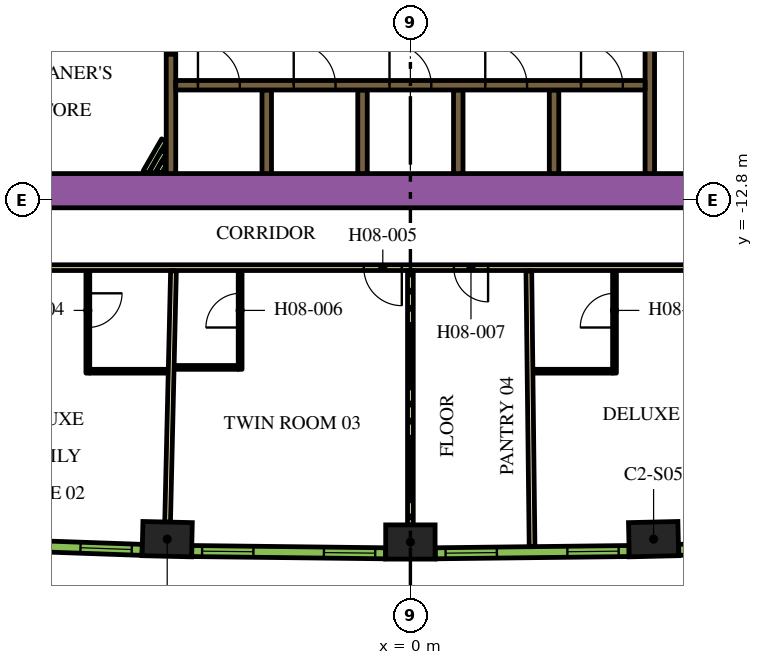
"""IFC4 building model, lengths in metres.
Left out: names, types, materials, properties, quantities, classifications, styles, units other than length and angle.
Written with IfcOpenShell. Run it as: python <this file> out.ifc"""

import sys

from ifc_helpers import new_model, si_unit, direction, frame, frame_2d, origin, origin_2d, place, context, subcontext, project, spatial, rectangle, extrude, element, fill, save


model = new_model("IFC4")
c1 = context("Model", 3, precision=1e-05, world=origin(), true_north=direction((0.0, 1.0)))
c2 = subcontext(c1, "Body", "Model", "MODEL_VIEW")
j1 = project(units=[si_unit("LENGTHUNIT", "METRE"), si_unit("PLANEANGLEUNIT", "RADIAN")], contexts=[c1])
p1 = place(None, origin())
s1 = spatial("IfcSite", under=j1, at=p1, CompositionType="ELEMENT")
p2 = place(p1, origin())
s2 = spatial("IfcBuilding", under=s1, at=p2, CompositionType="ELEMENT")
p3 = place(p2, frame((0.0, 0.0, 111.0)))
s3 = spatial("IfcBuildingStorey", under=s2, at=p3, CompositionType="ELEMENT", Elevation=111.0)
for number, where, z_axis, x_axis in (
    (1, (-6.399, -21.719, 0.0), (0.0, 0.0, 1.0), (1.0, -0.023, 0.0)),
    (2, (0.0, -21.794, 0.0), (0.0, 0.0, 1.0), (1.0, 0.0, 0.0)),
    (3, (6.399, -21.719, 0.0), (0.0, 0.0, 1.0), (1.0, 0.023, 0.0)),
):
    element("IfcColumn", number, at=place(p3, frame(where, z_axis=z_axis, x_axis=x_axis)), inside=s3, PredefinedType="COLUMN", context=c2, shape_type="SweptSolid", body=[
        extrude(rectangle(XDim=1.3, YDim=0.9, at=origin_2d()), origin(), (0.0, 0.0, 1.0), 3.9),
    ])
p4 = place(p3, frame((-12.019, -12.55, 0.0), z_axis=(0.0, 0.0, 1.0), x_axis=(1.0, 0.0, 0.0)))
e4 = element("IfcWall", 4, at=p4, inside=s3, PredefinedType="SOLIDWALL", context=c2, shape_type="SweptSolid", body=[
    extrude(rectangle(XDim=21.63, YDim=0.9, at=frame_2d((10.815, 0.0))), origin(), (0.0, 0.0, 1.0), 3.9),
])
p5 = place(p3, frame((12.84, -9.261, 0.0), z_axis=(0.0, 0.0, 1.0), x_axis=(-0.866013990052, 0.500019768644, 0.0)))
e5 = element("IfcWall", 5, at=p5, inside=s3, PredefinedType="SOLIDWALL", context=c2, shape_type="SweptSolid", body=[
    extrude(rectangle(XDim=6.8, YDim=0.25, at=frame_2d((3.4, 0.0))), origin(), (0.0, 0.0, 1.0), 3.9),
])
p6 = place(p3, frame((-12.84, -9.261, 0.0), z_axis=(0.0, 0.0, 1.0), x_axis=(0.866016039709, 0.500016218704, 0.0)))
e6 = element("IfcWall", 6, at=p6, inside=s3, PredefinedType="SOLIDWALL", context=c2, shape_type="SweptSolid", body=[
    extrude(rectangle(XDim=7.05, YDim=0.25, at=frame_2d((3.525, 0.0))), origin(), (0.0, 0.0, 1.0), 3.9),
])
p7 = place(p3, frame((-3.78, -12.1, 0.0), z_axis=(0.0, 0.0, 1.0), x_axis=(0.0, 1.0, 0.0)))
e7 = element("IfcWall", 7, at=p7, inside=s3, PredefinedType="SOLIDWALL", context=c2, shape_type="SweptSolid", body=[
    extrude(rectangle(XDim=2.2, YDim=0.25, at=frame_2d((1.1, 0.0))), origin(), (0.0, 0.0, 1.0), 3.9),
])
p8 = place(p3, frame((-6.3, -12.1, 0.0), z_axis=(0.0, 0.0, 1.0), x_axis=(0.0, 1.0, 0.0)))
e8 = element("IfcWall", 8, at=p8, inside=s3, PredefinedType="SOLIDWALL", context=c2, shape_type="SweptSolid", body=[
    extrude(rectangle(XDim=3.146, YDim=0.25, at=frame_2d((1.573, 0.0))), origin(), (0.0, 0.0, 1.0), 3.9),
])
p9 = place(p3, frame((6.3, -8.67, 0.0), z_axis=(0.0, 0.0, 1.0), x_axis=(0.0, -1.0, 0.0)))
e9 = element("IfcWall", 9, at=p9, inside=s3, PredefinedType="SOLIDWALL", context=c2, shape_type="SweptSolid", body=[
    extrude(rectangle(XDim=3.43, YDim=0.25, at=frame_2d((1.715, 0.0))), origin(), (0.0, 0.0, 1.0), 3.9),
])
for number, where, z_axis, x_axis in (
    (10, (3.78, -12.1, 0.0), (0.0, 0.0, 1.0), (0.0, 1.0, 0.0)),
    (11, (1.26, -12.1, 0.0), (0.0, 0.0, 1.0), (0.0, 1.0, 0.0)),
    (12, (-1.26, -12.1, 0.0), (0.0, 0.0, 1.0), (0.0, 1.0, 0.0)),
):
    element("IfcWall", number, at=place(p3, frame(where, z_axis=z_axis, x_axis=x_axis)), inside=s3, PredefinedType="SOLIDWALL", context=c2, shape_type="SweptSolid", body=[
        extrude(rectangle(XDim=2.2, YDim=0.25, at=frame_2d((1.1, 0.0))), origin(), (0.0, 0.0, 1.0), 3.9),
    ])
p10 = place(p3, frame((-6.968, -12.068, 0.0), z_axis=(0.0, 0.0, 1.0), x_axis=(0.49998975084, 0.866031321059, 0.0)))
e13 = element("IfcWall", 13, at=p10, inside=s3, PredefinedType="PARTITIONING", context=c2, shape_type="SweptSolid", body=[
    extrude(rectangle(XDim=0.975, YDim=0.15, at=frame_2d((0.488, 0.0))), origin(), (0.0, 0.0, 1.0), 2.75),
])
p11 = place(p3, frame((-6.794, -12.068, 0.0), z_axis=(0.0, 0.0, 1.0), x_axis=(0.49985693963, 0.866107983974, 0.0)))
e14 = element("IfcWall", 14, at=p11, inside=s3, PredefinedType="PARTITIONING", context=c2, shape_type="SweptSolid", body=[
    extrude(rectangle(XDim=0.629, YDim=0.15, at=frame_2d((0.314, 0.0))), origin(), (0.0, 0.0, 1.0), 2.75),
])
p12 = place(p3, frame((-6.621, -12.068, 0.0), z_axis=(0.0, 0.0, 1.0), x_axis=(0.500046963369, 0.865998287773, 0.0)))
e15 = element("IfcWall", 15, at=p12, inside=s3, PredefinedType="PARTITIONING", context=c2, shape_type="SweptSolid", body=[
    extrude(rectangle(XDim=0.282, YDim=0.15, at=frame_2d((0.141, 0.0))), origin(), (0.0, 0.0, 1.0), 2.75),
])
p13 = place(p3, frame((-6.175, -9.775, 0.0), z_axis=(0.0, 0.0, 1.0), x_axis=(1.0, 0.0, 0.0)))
e16 = element("IfcWall", 16, at=p13, inside=s3, PredefinedType="SOLIDWALL", context=c2, shape_type="SweptSolid", body=[
    extrude(rectangle(XDim=12.35, YDim=0.25, at=frame_2d((6.175, 0.0))), origin(), (0.0, 0.0, 1.0), 3.9),
])
p14 = place(p13, frame((0.585, 0.0, 0.0)))
e17 = element("IfcOpeningElement", 17, at=p14, cuts=e16, PredefinedType="OPENING", context=c2, shape_type="SweptSolid", body=[
    extrude(rectangle(XDim=1.1, YDim=2.1, at=frame_2d((0.55, 1.05))), frame((0.0, 0.135, 0.0), z_axis=(0.0, -1.0, 0.0), x_axis=(1.0, 0.0, 0.0)), (0.0, 0.0, 1.0), 0.27),
])
p15 = place(p13, frame((3.105, 0.0, 0.0)))
e18 = element("IfcOpeningElement", 18, at=p15, cuts=e16, PredefinedType="OPENING", context=c2, shape_type="SweptSolid", body=[
    extrude(rectangle(XDim=1.1, YDim=2.1, at=frame_2d((0.55, 1.05))), frame((0.0, 0.135, 0.0), z_axis=(0.0, -1.0, 0.0), x_axis=(1.0, 0.0, 0.0)), (0.0, 0.0, 1.0), 0.27),
])
p16 = place(p13, frame((5.625, 0.0, 0.0)))
e19 = element("IfcOpeningElement", 19, at=p16, cuts=e16, PredefinedType="OPENING", context=c2, shape_type="SweptSolid", body=[
    extrude(rectangle(XDim=1.1, YDim=2.1, at=frame_2d((0.55, 1.05))), frame((0.0, 0.135, 0.0), z_axis=(0.0, -1.0, 0.0), x_axis=(1.0, 0.0, 0.0)), (0.0, 0.0, 1.0), 0.27),
])
p17 = place(p13, frame((8.145, 0.0, 0.0)))
e20 = element("IfcOpeningElement", 20, at=p17, cuts=e16, PredefinedType="OPENING", context=c2, shape_type="SweptSolid", body=[
    extrude(rectangle(XDim=1.1, YDim=2.1, at=frame_2d((0.55, 1.05))), frame((0.0, 0.135, 0.0), z_axis=(0.0, -1.0, 0.0), x_axis=(1.0, 0.0, 0.0)), (0.0, 0.0, 1.0), 0.27),
])
p18 = place(p13, frame((10.665, 0.0, 0.0)))
e21 = element("IfcOpeningElement", 21, at=p18, cuts=e16, PredefinedType="OPENING", context=c2, shape_type="SweptSolid", body=[
    extrude(rectangle(XDim=1.1, YDim=2.1, at=frame_2d((0.55, 1.05))), frame((0.0, 0.135, 0.0), z_axis=(0.0, -1.0, 0.0), x_axis=(1.0, 0.0, 0.0)), (0.0, 0.0, 1.0), 0.27),
])
p19 = place(p3, frame((-6.3, -7.154, 0.0), z_axis=(0.0, 0.0, 1.0), x_axis=(0.0, -1.0, 0.0)))
e22 = element("IfcWall", 22, at=p19, inside=s3, PredefinedType="SOLIDWALL", context=c2, shape_type="SweptSolid", body=[
    extrude(rectangle(XDim=1.8, YDim=0.25, at=frame_2d((0.9, 0.0))), origin(), (0.0, 0.0, 1.0), 3.9),
])
p20 = place(p19, frame((0.45, 0.0, 0.0)))
e23 = element("IfcOpeningElement", 23, at=p20, cuts=e22, PredefinedType="OPENING", context=c2, shape_type="SweptSolid", body=[
    extrude(rectangle(XDim=0.9, YDim=2.1, at=frame_2d((0.45, 1.05))), frame((0.0, 0.135, 0.0), z_axis=(0.0, -1.0, 0.0), x_axis=(1.0, 0.0, 0.0)), (0.0, 0.0, 1.0), 0.27),
])
p21 = place(p3, frame((12.918, -14.575, 0.0), z_axis=(0.0, 0.0, 1.0), x_axis=(-1.0, 0.0, 0.0)))
e24 = element("IfcWall", 24, at=p21, inside=s3, PredefinedType="PARTITIONING", context=c2, shape_type="SweptSolid", body=[
    extrude(rectangle(XDim=25.766, YDim=0.15, at=frame_2d((12.883, 0.0))), origin(), (0.0, 0.0, 1.0), 2.75),
])
p22 = place(p21, frame((24.586, 0.0, 0.0)))
e25 = element("IfcOpeningElement", 25, at=p22, cuts=e24, PredefinedType="OPENING", context=c2, shape_type="SweptSolid", body=[
    extrude(rectangle(XDim=1.0, YDim=2.1, at=frame_2d((0.5, 1.05))), frame((0.0, 0.085, 0.0), z_axis=(0.0, -1.0, 0.0), x_axis=(1.0, 0.0, 0.0)), (0.0, 0.0, 1.0), 0.17),
])
p23 = place(p21, frame((13.144, 0.0, 0.0)))
e26 = element("IfcOpeningElement", 26, at=p23, cuts=e24, PredefinedType="OPENING", context=c2, shape_type="SweptSolid", body=[
    extrude(rectangle(XDim=1.0, YDim=2.1, at=frame_2d((0.5, 1.05))), frame((0.0, 0.085, 0.0), z_axis=(0.0, -1.0, 0.0), x_axis=(1.0, 0.0, 0.0)), (0.0, 0.0, 1.0), 0.17),
])
p24 = place(p21, frame((10.874, 0.0, 0.0)))
e27 = element("IfcOpeningElement", 27, at=p24, cuts=e24, PredefinedType="OPENING", context=c2, shape_type="SweptSolid", body=[
    extrude(rectangle(XDim=0.9, YDim=2.1, at=frame_2d((0.45, 1.05))), frame((0.0, 0.085, 0.0), z_axis=(0.0, -1.0, 0.0), x_axis=(1.0, 0.0, 0.0)), (0.0, 0.0, 1.0), 0.17),
])
p25 = place(p21, frame((0.596, 0.0, 0.0)))
e28 = element("IfcOpeningElement", 28, at=p25, cuts=e24, PredefinedType="OPENING", context=c2, shape_type="SweptSolid", body=[
    extrude(rectangle(XDim=1.0, YDim=2.1, at=frame_2d((0.5, 1.05))), frame((0.0, 0.085, 0.0), z_axis=(0.0, -1.0, 0.0), x_axis=(1.0, 0.0, 0.0)), (0.0, 0.0, 1.0), 0.17),
])
p26 = place(p3, frame((-6.389, -21.269, 0.0), z_axis=(0.0, 0.0, 1.0), x_axis=(0.023377429176, 0.999726710559, 0.0)))
e29 = element("IfcWall", 29, at=p26, inside=s3, PredefinedType="PARTITIONING", context=c2, shape_type="SweptSolid", body=[
    extrude(rectangle(XDim=6.611, YDim=0.15, at=frame_2d((3.305, 0.0))), origin(), (0.0, 0.0, 1.0), 2.75),
])
p27 = place(p3, frame((0.0, -21.344, 0.0), z_axis=(0.0, 0.0, 1.0), x_axis=(0.0, 1.0, 0.0)))
e30 = element("IfcWall", 30, at=p27, inside=s3, PredefinedType="PARTITIONING", context=c2, shape_type="SweptSolid", body=[
    extrude(rectangle(XDim=6.694, YDim=0.15, at=frame_2d((3.347, 0.0))), origin(), (0.0, 0.0, 1.0), 2.75),
])
p28 = place(p3, frame((3.202, -21.916, 0.0), z_axis=(0.0, 0.0, 1.0), x_axis=(-0.011707696285, 0.999931462575, 0.0)))
e31 = element("IfcWall", 31, at=p28, inside=s3, PredefinedType="PARTITIONING", context=c2, shape_type="SweptSolid", body=[
    extrude(rectangle(XDim=7.257, YDim=0.15, at=frame_2d((3.628, 0.0))), origin(), (0.0, 0.0, 1.0), 2.75),
])
p29 = place(p3, frame((-8.488, -14.65, 0.0), z_axis=(0.0, 0.0, 1.0), x_axis=(0.0, -1.0, 0.0)))
e32 = element("IfcWall", 32, at=p29, inside=s3, PredefinedType="PARTITIONING", context=c2, shape_type="SweptSolid", body=[
    extrude(rectangle(XDim=2.7, YDim=0.1, at=frame_2d((1.35, 0.0))), origin(), (0.0, 0.0, 1.0), 2.75),
])
p30 = place(p29, frame((0.6, 0.0, 0.0)))
e33 = element("IfcOpeningElement", 33, at=p30, cuts=e32, PredefinedType="OPENING", context=c2, shape_type="SweptSolid", body=[
    extrude(rectangle(XDim=0.9, YDim=2.1, at=frame_2d((0.45, 1.05))), frame((0.0, 0.06, 0.0), z_axis=(0.0, -1.0, 0.0), x_axis=(1.0, 0.0, 0.0)), (0.0, 0.0, 1.0), 0.12),
])
p31 = place(p3, frame((-8.438, -17.3, 0.0), z_axis=(0.0, 0.0, 1.0), x_axis=(1.0, 0.0, 0.0)))
e34 = element("IfcWall", 34, at=p31, inside=s3, PredefinedType="PARTITIONING", context=c2, shape_type="SweptSolid", body=[
    extrude(rectangle(XDim=2.06, YDim=0.1, at=frame_2d((1.03, 0.0))), origin(), (0.0, 0.0, 1.0), 2.75),
])
p32 = place(p3, frame((-4.48, -17.25, 0.0), z_axis=(0.0, 0.0, 1.0), x_axis=(0.0, 1.0, 0.0)))
e35 = element("IfcWall", 35, at=p32, inside=s3, PredefinedType="PARTITIONING", context=c2, shape_type="SweptSolid", body=[
    extrude(rectangle(XDim=2.6, YDim=0.1, at=frame_2d((1.3, 0.0))), origin(), (0.0, 0.0, 1.0), 2.75),
])
p33 = place(p32, frame((1.1, 0.0, 0.0)))
e36 = element("IfcOpeningElement", 36, at=p33, cuts=e35, PredefinedType="OPENING", context=c2, shape_type="SweptSolid", body=[
    extrude(rectangle(XDim=0.9, YDim=2.1, at=frame_2d((0.45, 1.05))), frame((0.0, 0.06, 0.0), z_axis=(0.0, -1.0, 0.0), x_axis=(1.0, 0.0, 0.0)), (0.0, 0.0, 1.0), 0.12),
])
p34 = place(p3, frame((-4.53, -17.2, 0.0), z_axis=(0.0, 0.0, 1.0), x_axis=(-1.0, 0.0, 0.0)))
e37 = element("IfcWall", 37, at=p34, inside=s3, PredefinedType="PARTITIONING", context=c2, shape_type="SweptSolid", body=[
    extrude(rectangle(XDim=1.68, YDim=0.1, at=frame_2d((0.84, 0.0))), origin(), (0.0, 0.0, 1.0), 2.75),
])
p35 = place(p3, frame((5.371, -17.35, 0.0), z_axis=(0.0, 0.0, 1.0), x_axis=(0.0, 1.0, 0.0)))
e38 = element("IfcWall", 38, at=p35, inside=s3, PredefinedType="PARTITIONING", context=c2, shape_type="SweptSolid", body=[
    extrude(rectangle(XDim=2.7, YDim=0.1, at=frame_2d((1.35, 0.0))), origin(), (0.0, 0.0, 1.0), 2.75),
])
p36 = place(p35, frame((1.2, 0.0, 0.0)))
e39 = element("IfcOpeningElement", 39, at=p36, cuts=e38, PredefinedType="OPENING", context=c2, shape_type="SweptSolid", body=[
    extrude(rectangle(XDim=0.9, YDim=2.1, at=frame_2d((0.45, 1.05))), frame((0.0, 0.06, 0.0), z_axis=(0.0, -1.0, 0.0), x_axis=(1.0, 0.0, 0.0)), (0.0, 0.0, 1.0), 0.12),
])
p37 = place(p3, frame((5.321, -17.3, 0.0), z_axis=(0.0, 0.0, 1.0), x_axis=(-1.0, 0.0, 0.0)))
e40 = element("IfcWall", 40, at=p37, inside=s3, PredefinedType="PARTITIONING", context=c2, shape_type="SweptSolid", body=[
    extrude(rectangle(XDim=2.09, YDim=0.1, at=frame_2d((1.045, 0.0))), origin(), (0.0, 0.0, 1.0), 2.75),
])
p38 = place(p3, frame((-12.157, -21.822, 0.0), z_axis=(0.0, 0.0, 1.0), x_axis=(0.999385993957, -0.035037623812, 0.0)))
e41 = element("IfcWall", 41, at=p38, inside=s3, PredefinedType="SOLIDWALL", context=c2, shape_type="SweptSolid", body=[
    extrude(rectangle(XDim=5.101, YDim=0.29, at=frame_2d((2.55, 0.0))), origin(), (0.0, 0.0, 1.0), 3.65),
])
p39 = place(p38, frame((0.273, 0.0, 0.9)))
e42 = element("IfcOpeningElement", 42, at=p39, cuts=e41, PredefinedType="OPENING", context=c2, shape_type="SweptSolid", body=[
    extrude(rectangle(XDim=1.35, YDim=2.15, at=frame_2d((0.675, 1.075))), frame((0.0, 0.155, 0.0), z_axis=(0.0, -1.0, 0.0), x_axis=(1.0, 0.0, 0.0)), (0.0, 0.0, 1.0), 0.31),
])
p40 = place(p38, frame((3.478, 0.0, 0.9)))
e43 = element("IfcOpeningElement", 43, at=p40, cuts=e41, PredefinedType="OPENING", context=c2, shape_type="SweptSolid", body=[
    extrude(rectangle(XDim=1.35, YDim=2.15, at=frame_2d((0.675, 1.075))), frame((0.0, 0.155, 0.0), z_axis=(0.0, -1.0, 0.0), x_axis=(1.0, 0.0, 0.0)), (0.0, 0.0, 1.0), 0.31),
])
p41 = place(p3, frame((-5.753, -22.031, 0.0), z_axis=(0.0, 0.0, 1.0), x_axis=(0.999931786565, -0.011679992145, 0.0)))
e44 = element("IfcWall", 44, at=p41, inside=s3, PredefinedType="SOLIDWALL", context=c2, shape_type="SweptSolid", body=[
    extrude(rectangle(XDim=5.1, YDim=0.29, at=frame_2d((2.55, 0.0))), origin(), (0.0, 0.0, 1.0), 3.65),
])
p42 = place(p41, frame((0.272, 0.0, 0.9)))
e45 = element("IfcOpeningElement", 45, at=p42, cuts=e44, PredefinedType="OPENING", context=c2, shape_type="SweptSolid", body=[
    extrude(rectangle(XDim=1.35, YDim=2.15, at=frame_2d((0.675, 1.075))), frame((0.0, 0.155, 0.0), z_axis=(0.0, -1.0, 0.0), x_axis=(1.0, 0.0, 0.0)), (0.0, 0.0, 1.0), 0.31),
])
p43 = place(p41, frame((3.478, 0.0, 0.9)))
e46 = element("IfcOpeningElement", 46, at=p43, cuts=e44, PredefinedType="OPENING", context=c2, shape_type="SweptSolid", body=[
    extrude(rectangle(XDim=1.35, YDim=2.15, at=frame_2d((0.675, 1.075))), frame((0.0, 0.155, 0.0), z_axis=(0.0, -1.0, 0.0), x_axis=(1.0, 0.0, 0.0)), (0.0, 0.0, 1.0), 0.31),
])
p44 = place(p3, frame((0.653, -22.091, 0.0), z_axis=(0.0, 0.0, 1.0), x_axis=(0.999931786565, 0.011679992145, 0.0)))
e47 = element("IfcWall", 47, at=p44, inside=s3, PredefinedType="SOLIDWALL", context=c2, shape_type="SweptSolid", body=[
    extrude(rectangle(XDim=5.1, YDim=0.29, at=frame_2d((2.55, 0.0))), origin(), (0.0, 0.0, 1.0), 3.65),
])
p45 = place(p44, frame((0.273, 0.0, 0.9)))
e48 = element("IfcOpeningElement", 48, at=p45, cuts=e47, PredefinedType="OPENING", context=c2, shape_type="SweptSolid", body=[
    extrude(rectangle(XDim=1.35, YDim=2.15, at=frame_2d((0.675, 1.075))), frame((0.0, 0.155, 0.0), z_axis=(0.0, -1.0, 0.0), x_axis=(1.0, 0.0, 0.0)), (0.0, 0.0, 1.0), 0.31),
])
p46 = place(p44, frame((3.478, 0.0, 0.9)))
e49 = element("IfcOpeningElement", 49, at=p46, cuts=e47, PredefinedType="OPENING", context=c2, shape_type="SweptSolid", body=[
    extrude(rectangle(XDim=1.35, YDim=2.15, at=frame_2d((0.675, 1.075))), frame((0.0, 0.155, 0.0), z_axis=(0.0, -1.0, 0.0), x_axis=(1.0, 0.0, 0.0)), (0.0, 0.0, 1.0), 0.31),
])
p47 = place(p3, frame((7.059, -22.001, 0.0), z_axis=(0.0, 0.0, 1.0), x_axis=(0.999385993957, 0.035037623812, 0.0)))
e50 = element("IfcWall", 50, at=p47, inside=s3, PredefinedType="SOLIDWALL", context=c2, shape_type="SweptSolid", body=[
    extrude(rectangle(XDim=5.101, YDim=0.29, at=frame_2d((2.55, 0.0))), origin(), (0.0, 0.0, 1.0), 3.65),
])
p48 = place(p47, frame((0.273, 0.0, 0.9)))
e51 = element("IfcOpeningElement", 51, at=p48, cuts=e50, PredefinedType="OPENING", context=c2, shape_type="SweptSolid", body=[
    extrude(rectangle(XDim=1.35, YDim=2.15, at=frame_2d((0.675, 1.075))), frame((0.0, 0.155, 0.0), z_axis=(0.0, -1.0, 0.0), x_axis=(1.0, 0.0, 0.0)), (0.0, 0.0, 1.0), 0.31),
])
p49 = place(p47, frame((3.478, 0.0, 0.9)))
e52 = element("IfcOpeningElement", 52, at=p49, cuts=e50, PredefinedType="OPENING", context=c2, shape_type="SweptSolid", body=[
    extrude(rectangle(XDim=1.35, YDim=2.15, at=frame_2d((0.675, 1.075))), frame((0.0, 0.155, 0.0), z_axis=(0.0, -1.0, 0.0), x_axis=(1.0, 0.0, 0.0)), (0.0, 0.0, 1.0), 0.31),
])
p50 = place(p14, origin())
e53 = element("IfcDoor", 53, at=p50, inside=s3, OperationType="DOUBLE_DOOR_SLIDING", PredefinedType="DOOR", context=c2, shape_type="SweptSolid", body=[
    extrude(rectangle(XDim=1.1, YDim=2.1, at=frame_2d((0.55, 1.05))), frame((0.0, 0.025, 0.0), z_axis=(0.0, -1.0, 0.0), x_axis=(1.0, 0.0, 0.0)), (0.0, 0.0, 1.0), 0.05),
])
fill(e17, e53)
p51 = place(p15, origin())
e54 = element("IfcDoor", 54, at=p51, inside=s3, OperationType="DOUBLE_DOOR_SLIDING", PredefinedType="DOOR", context=c2, shape_type="SweptSolid", body=[
    extrude(rectangle(XDim=1.1, YDim=2.1, at=frame_2d((0.55, 1.05))), frame((0.0, 0.025, 0.0), z_axis=(0.0, -1.0, 0.0), x_axis=(1.0, 0.0, 0.0)), (0.0, 0.0, 1.0), 0.05),
])
fill(e18, e54)
p52 = place(p16, origin())
e55 = element("IfcDoor", 55, at=p52, inside=s3, OperationType="DOUBLE_DOOR_SLIDING", PredefinedType="DOOR", context=c2, shape_type="SweptSolid", body=[
    extrude(rectangle(XDim=1.1, YDim=2.1, at=frame_2d((0.55, 1.05))), frame((0.0, 0.025, 0.0), z_axis=(0.0, -1.0, 0.0), x_axis=(1.0, 0.0, 0.0)), (0.0, 0.0, 1.0), 0.05),
])
fill(e19, e55)
p53 = place(p17, origin())
e56 = element("IfcDoor", 56, at=p53, inside=s3, OperationType="DOUBLE_DOOR_SLIDING", PredefinedType="DOOR", context=c2, shape_type="SweptSolid", body=[
    extrude(rectangle(XDim=1.1, YDim=2.1, at=frame_2d((0.55, 1.05))), frame((0.0, 0.025, 0.0), z_axis=(0.0, -1.0, 0.0), x_axis=(1.0, 0.0, 0.0)), (0.0, 0.0, 1.0), 0.05),
])
fill(e20, e56)
p54 = place(p18, origin())
e57 = element("IfcDoor", 57, at=p54, inside=s3, OperationType="DOUBLE_DOOR_SLIDING", PredefinedType="DOOR", context=c2, shape_type="SweptSolid", body=[
    extrude(rectangle(XDim=1.1, YDim=2.1, at=frame_2d((0.55, 1.05))), frame((0.0, 0.025, 0.0), z_axis=(0.0, -1.0, 0.0), x_axis=(1.0, 0.0, 0.0)), (0.0, 0.0, 1.0), 0.05),
])
fill(e21, e57)
p55 = place(p30, origin())
e58 = element("IfcDoor", 58, at=p55, inside=s3, OperationType="SINGLE_SWING_LEFT", PredefinedType="DOOR", context=c2, shape_type="SweptSolid", body=[
    extrude(rectangle(XDim=0.9, YDim=2.1, at=frame_2d((0.45, 1.05))), frame((0.0, 0.025, 0.0), z_axis=(0.0, -1.0, 0.0), x_axis=(1.0, 0.0, 0.0)), (0.0, 0.0, 1.0), 0.05),
])
fill(e33, e58)
p56 = place(p23, origin())
e59 = element("IfcDoor", 59, at=p56, inside=s3, OperationType="SINGLE_SWING_LEFT", PredefinedType="DOOR", context=c2, shape_type="SweptSolid", body=[
    extrude(rectangle(XDim=1.0, YDim=2.1, at=frame_2d((0.5, 1.05))), frame((0.0, 0.025, 0.0), z_axis=(0.0, -1.0, 0.0), x_axis=(1.0, 0.0, 0.0)), (0.0, 0.0, 1.0), 0.05),
])
fill(e26, e59)
p57 = place(p33, origin())
e60 = element("IfcDoor", 60, at=p57, inside=s3, OperationType="SINGLE_SWING_RIGHT", PredefinedType="DOOR", context=c2, shape_type="SweptSolid", body=[
    extrude(rectangle(XDim=0.9, YDim=2.1, at=frame_2d((0.45, 1.05))), frame((0.0, 0.025, 0.0), z_axis=(0.0, -1.0, 0.0), x_axis=(1.0, 0.0, 0.0)), (0.0, 0.0, 1.0), 0.05),
])
fill(e36, e60)
p58 = place(p24, origin())
e61 = element("IfcDoor", 61, at=p58, inside=s3, OperationType="SINGLE_SWING_RIGHT", PredefinedType="DOOR", context=c2, shape_type="SweptSolid", body=[
    extrude(rectangle(XDim=0.9, YDim=2.1, at=frame_2d((0.45, 1.05))), frame((0.0, 0.025, 0.0), z_axis=(0.0, -1.0, 0.0), x_axis=(1.0, 0.0, 0.0)), (0.0, 0.0, 1.0), 0.05),
])
fill(e27, e61)
p59 = place(p36, origin())
e62 = element("IfcDoor", 62, at=p59, inside=s3, OperationType="SINGLE_SWING_LEFT", PredefinedType="DOOR", context=c2, shape_type="SweptSolid", body=[
    extrude(rectangle(XDim=0.9, YDim=2.1, at=frame_2d((0.45, 1.05))), frame((0.0, 0.025, 0.0), z_axis=(0.0, -1.0, 0.0), x_axis=(1.0, 0.0, 0.0)), (0.0, 0.0, 1.0), 0.05),
])
fill(e39, e62)
p60 = place(p40, origin())
e63 = element("IfcWindow", 63, at=p60, inside=s3, PartitioningType="DOUBLE_PANEL_VERTICAL", PredefinedType="WINDOW", context=c2, shape_type="SweptSolid", body=[
    extrude(rectangle(XDim=1.35, YDim=2.15, at=frame_2d((0.675, 1.075))), frame((0.0, 0.015, 0.0), z_axis=(0.0, -1.0, 0.0), x_axis=(1.0, 0.0, 0.0)), (0.0, 0.0, 1.0), 0.06),
])
fill(e43, e63)
p61 = place(p42, origin())
e64 = element("IfcWindow", 64, at=p61, inside=s3, PartitioningType="DOUBLE_PANEL_VERTICAL", PredefinedType="WINDOW", context=c2, shape_type="SweptSolid", body=[
    extrude(rectangle(XDim=1.35, YDim=2.15, at=frame_2d((0.675, 1.075))), frame((0.0, 0.015, 0.0), z_axis=(0.0, -1.0, 0.0), x_axis=(1.0, 0.0, 0.0)), (0.0, 0.0, 1.0), 0.06),
])
fill(e45, e64)
p62 = place(p43, origin())
e65 = element("IfcWindow", 65, at=p62, inside=s3, PartitioningType="DOUBLE_PANEL_VERTICAL", PredefinedType="WINDOW", context=c2, shape_type="SweptSolid", body=[
    extrude(rectangle(XDim=1.35, YDim=2.15, at=frame_2d((0.675, 1.075))), frame((0.0, 0.015, 0.0), z_axis=(0.0, -1.0, 0.0), x_axis=(1.0, 0.0, 0.0)), (0.0, 0.0, 1.0), 0.06),
])
fill(e46, e65)
p63 = place(p45, origin())
e66 = element("IfcWindow", 66, at=p63, inside=s3, PartitioningType="DOUBLE_PANEL_VERTICAL", PredefinedType="WINDOW", context=c2, shape_type="SweptSolid", body=[
    extrude(rectangle(XDim=1.35, YDim=2.15, at=frame_2d((0.675, 1.075))), frame((0.0, 0.015, 0.0), z_axis=(0.0, -1.0, 0.0), x_axis=(1.0, 0.0, 0.0)), (0.0, 0.0, 1.0), 0.06),
])
fill(e48, e66)
p64 = place(p46, origin())
e67 = element("IfcWindow", 67, at=p64, inside=s3, PartitioningType="DOUBLE_PANEL_VERTICAL", PredefinedType="WINDOW", context=c2, shape_type="SweptSolid", body=[
    extrude(rectangle(XDim=1.35, YDim=2.15, at=frame_2d((0.675, 1.075))), frame((0.0, 0.015, 0.0), z_axis=(0.0, -1.0, 0.0), x_axis=(1.0, 0.0, 0.0)), (0.0, 0.0, 1.0), 0.06),
])
fill(e49, e67)
save(model, sys.argv[1])
